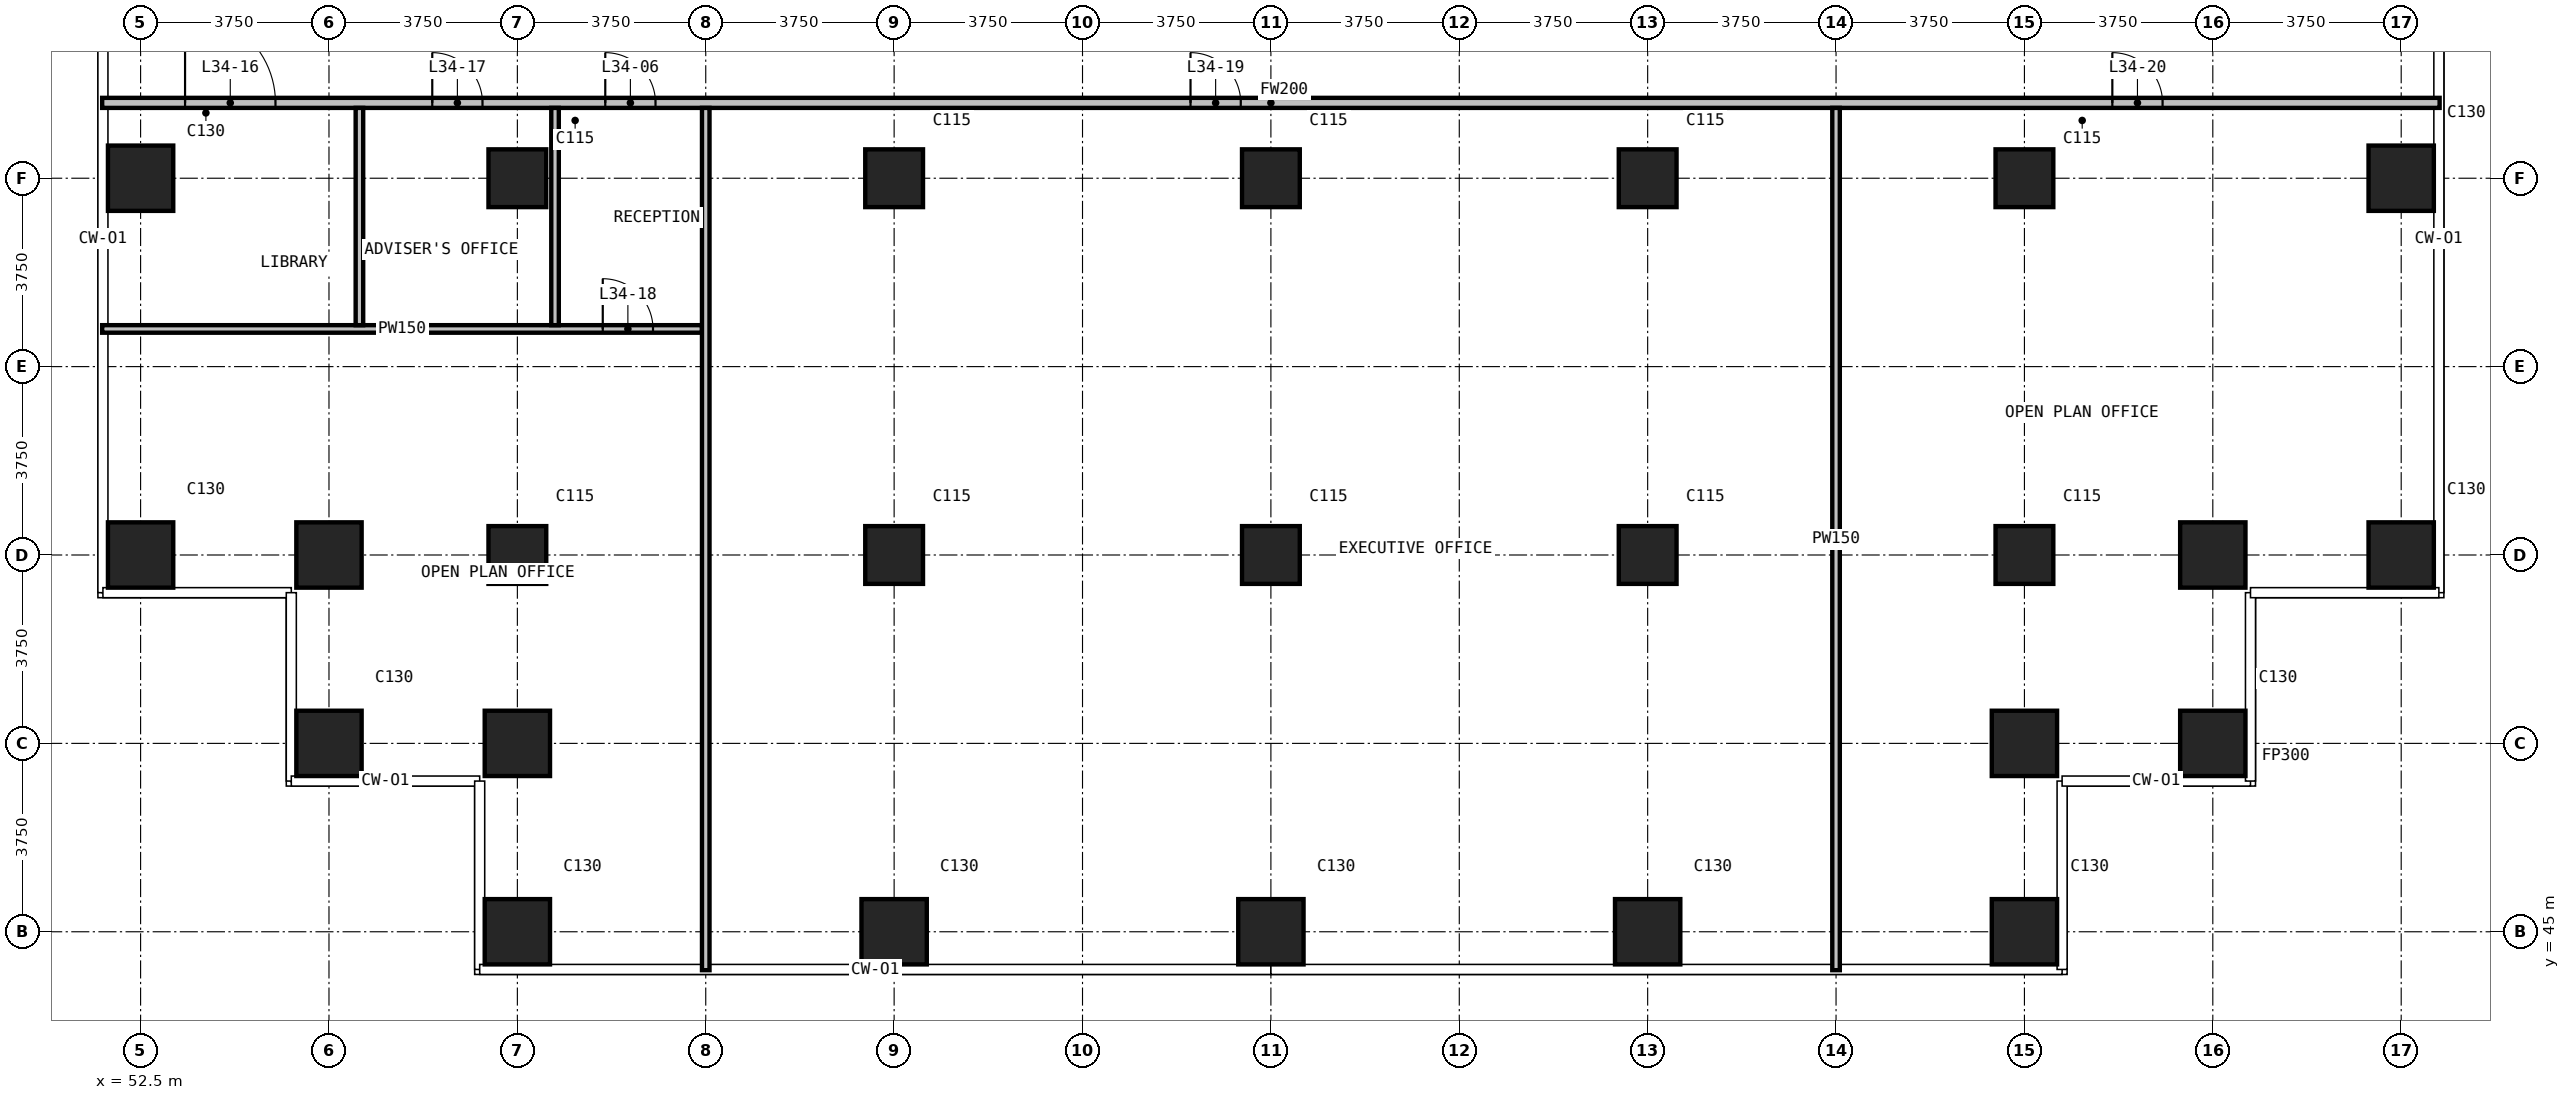
"""IFC4 building model, lengths in metres.
Left out: names, types, materials, properties, quantities, classifications, styles, units other than length and angle.
Written with IfcOpenShell. Run it as: python <this file> out.ifc"""

import sys

from ifc_helpers import new_model, si_unit, direction, frame, frame_2d, origin, origin_2d, place, context, subcontext, project, spatial, rectangle, extrude, element, fill, save


model = new_model("IFC4")
c1 = context("Model", 3, precision=1e-05, world=origin(), true_north=direction((0.0, 1.0)))
c2 = subcontext(c1, "Body", "Model", "MODEL_VIEW")
j1 = project(units=[si_unit("LENGTHUNIT", "METRE"), si_unit("PLANEANGLEUNIT", "RADIAN")], contexts=[c1])
p1 = place(None, origin())
s1 = spatial("IfcSite", under=j1, at=p1, CompositionType="ELEMENT")
p2 = place(p1, origin())
s2 = spatial("IfcBuilding", under=s1, at=p2, CompositionType="ELEMENT")
p3 = place(p2, frame((0.0, 0.0, 136.0)))
s3 = spatial("IfcBuildingStorey", under=s2, at=p3, CompositionType="ELEMENT", Elevation=136.0)
for number, where, z_axis, x_axis in (
    (1, (52.5, 52.5, 0.0), (0.0, 0.0, 1.0), (1.0, 0.0, 0.0)),
    (2, (52.5, 60.0, 0.0), (0.0, 0.0, 1.0), (1.0, 0.0, 0.0)),
    (3, (56.25, 48.75, 0.0), (0.0, 0.0, 1.0), (1.0, 0.0, 0.0)),
    (4, (56.25, 52.5, 0.0), (0.0, 0.0, 1.0), (1.0, 0.0, 0.0)),
    (5, (60.0, 45.0, 0.0), (0.0, 0.0, 1.0), (1.0, 0.0, 0.0)),
    (6, (60.0, 48.75, 0.0), (0.0, 0.0, 1.0), (1.0, 0.0, 0.0)),
):
    element("IfcColumn", number, at=place(p3, frame(where, z_axis=z_axis, x_axis=x_axis)), inside=s3, PredefinedType="COLUMN", context=c2, shape_type="SweptSolid", body=[
        extrude(rectangle(XDim=1.3, YDim=1.3, at=origin_2d()), origin(), (0.0, 0.0, 1.0), 3.6),
    ])
for number, where, z_axis, x_axis in (
    (7, (60.0, 52.5, 0.0), (0.0, 0.0, 1.0), (1.0, 0.0, 0.0)),
    (8, (60.0, 60.0, 0.0), (0.0, 0.0, 1.0), (1.0, 0.0, 0.0)),
):
    element("IfcColumn", number, at=place(p3, frame(where, z_axis=z_axis, x_axis=x_axis)), inside=s3, PredefinedType="COLUMN", context=c2, shape_type="SweptSolid", body=[
        extrude(rectangle(XDim=1.15, YDim=1.15, at=origin_2d()), origin(), (0.0, 0.0, 1.0), 3.6),
    ])
p4 = place(p3, frame((67.5, 45.0, 0.0), z_axis=(0.0, 0.0, 1.0), x_axis=(1.0, 0.0, 0.0)))
e9 = element("IfcColumn", 9, at=p4, inside=s3, PredefinedType="COLUMN", context=c2, shape_type="SweptSolid", body=[
    extrude(rectangle(XDim=1.3, YDim=1.3, at=origin_2d()), origin(), (0.0, 0.0, 1.0), 3.6),
])
for number, where, z_axis, x_axis in (
    (10, (67.5, 52.5, 0.0), (0.0, 0.0, 1.0), (1.0, 0.0, 0.0)),
    (11, (67.5, 60.0, 0.0), (0.0, 0.0, 1.0), (1.0, 0.0, 0.0)),
):
    element("IfcColumn", number, at=place(p3, frame(where, z_axis=z_axis, x_axis=x_axis)), inside=s3, PredefinedType="COLUMN", context=c2, shape_type="SweptSolid", body=[
        extrude(rectangle(XDim=1.15, YDim=1.15, at=origin_2d()), origin(), (0.0, 0.0, 1.0), 3.6),
    ])
p5 = place(p3, frame((75.0, 45.0, 0.0), z_axis=(0.0, 0.0, 1.0), x_axis=(1.0, 0.0, 0.0)))
e12 = element("IfcColumn", 12, at=p5, inside=s3, PredefinedType="COLUMN", context=c2, shape_type="SweptSolid", body=[
    extrude(rectangle(XDim=1.3, YDim=1.3, at=origin_2d()), origin(), (0.0, 0.0, 1.0), 3.6),
])
for number, where, z_axis, x_axis in (
    (13, (75.0, 52.5, 0.0), (0.0, 0.0, 1.0), (1.0, 0.0, 0.0)),
    (14, (75.0, 60.0, 0.0), (0.0, 0.0, 1.0), (1.0, 0.0, 0.0)),
):
    element("IfcColumn", number, at=place(p3, frame(where, z_axis=z_axis, x_axis=x_axis)), inside=s3, PredefinedType="COLUMN", context=c2, shape_type="SweptSolid", body=[
        extrude(rectangle(XDim=1.15, YDim=1.15, at=origin_2d()), origin(), (0.0, 0.0, 1.0), 3.6),
    ])
p6 = place(p3, frame((82.5, 45.0, 0.0), z_axis=(0.0, 0.0, 1.0), x_axis=(1.0, 0.0, 0.0)))
e15 = element("IfcColumn", 15, at=p6, inside=s3, PredefinedType="COLUMN", context=c2, shape_type="SweptSolid", body=[
    extrude(rectangle(XDim=1.3, YDim=1.3, at=origin_2d()), origin(), (0.0, 0.0, 1.0), 3.6),
])
for number, where, z_axis, x_axis in (
    (16, (82.5, 52.5, 0.0), (0.0, 0.0, 1.0), (1.0, 0.0, 0.0)),
    (17, (82.5, 60.0, 0.0), (0.0, 0.0, 1.0), (1.0, 0.0, 0.0)),
):
    element("IfcColumn", number, at=place(p3, frame(where, z_axis=z_axis, x_axis=x_axis)), inside=s3, PredefinedType="COLUMN", context=c2, shape_type="SweptSolid", body=[
        extrude(rectangle(XDim=1.15, YDim=1.15, at=origin_2d()), origin(), (0.0, 0.0, 1.0), 3.6),
    ])
for number, where, z_axis, x_axis in (
    (18, (90.0, 45.0, 0.0), (0.0, 0.0, 1.0), (1.0, 0.0, 0.0)),
    (19, (90.0, 48.75, 0.0), (0.0, 0.0, 1.0), (1.0, 0.0, 0.0)),
):
    element("IfcColumn", number, at=place(p3, frame(where, z_axis=z_axis, x_axis=x_axis)), inside=s3, PredefinedType="COLUMN", context=c2, shape_type="SweptSolid", body=[
        extrude(rectangle(XDim=1.3, YDim=1.3, at=origin_2d()), origin(), (0.0, 0.0, 1.0), 3.6),
    ])
for number, where, z_axis, x_axis in (
    (20, (90.0, 52.5, 0.0), (0.0, 0.0, 1.0), (1.0, 0.0, 0.0)),
    (21, (90.0, 60.0, 0.0), (0.0, 0.0, 1.0), (1.0, 0.0, 0.0)),
):
    element("IfcColumn", number, at=place(p3, frame(where, z_axis=z_axis, x_axis=x_axis)), inside=s3, PredefinedType="COLUMN", context=c2, shape_type="SweptSolid", body=[
        extrude(rectangle(XDim=1.15, YDim=1.15, at=origin_2d()), origin(), (0.0, 0.0, 1.0), 3.6),
    ])
for number, where, z_axis, x_axis in (
    (22, (93.75, 48.75, 0.0), (0.0, 0.0, 1.0), (1.0, 0.0, 0.0)),
    (23, (93.75, 52.5, 0.0), (0.0, 0.0, 1.0), (1.0, 0.0, 0.0)),
    (24, (97.5, 52.5, 0.0), (0.0, 0.0, 1.0), (1.0, 0.0, 0.0)),
    (25, (97.5, 60.0, 0.0), (0.0, 0.0, 1.0), (1.0, 0.0, 0.0)),
):
    element("IfcColumn", number, at=place(p3, frame(where, z_axis=z_axis, x_axis=x_axis)), inside=s3, PredefinedType="COLUMN", context=c2, shape_type="SweptSolid", body=[
        extrude(rectangle(XDim=1.3, YDim=1.3, at=origin_2d()), origin(), (0.0, 0.0, 1.0), 3.6),
    ])
p7 = place(p3, frame((51.735, 61.5, 0.0), z_axis=(0.0, 0.0, 1.0), x_axis=(1.0, 0.0, 0.0)))
e26 = element("IfcWall", 26, at=p7, inside=s3, PredefinedType="PARTITIONING", context=c2, shape_type="SweptSolid", body=[
    extrude(rectangle(XDim=46.53, YDim=0.2, at=frame_2d((23.265, 0.0))), origin(), (0.0, 0.0, 1.0), 3.3),
])
p8 = place(p7, frame((10.015, 0.0, 0.0)))
e27 = element("IfcOpeningElement", 27, at=p8, cuts=e26, PredefinedType="OPENING", context=c2, shape_type="SweptSolid", body=[
    extrude(rectangle(XDim=1.0, YDim=2.2, at=frame_2d((0.5, 1.1))), frame((0.0, 0.11, 0.0), z_axis=(0.0, -1.0, 0.0), x_axis=(1.0, 0.0, 0.0)), (0.0, 0.0, 1.0), 0.22),
])
p9 = place(p7, frame((1.65, 0.0, 0.0)))
e28 = element("IfcOpeningElement", 28, at=p9, cuts=e26, PredefinedType="OPENING", context=c2, shape_type="SweptSolid", body=[
    extrude(rectangle(XDim=1.8, YDim=2.2, at=frame_2d((0.9, 1.1))), frame((0.0, 0.11, 0.0), z_axis=(0.0, -1.0, 0.0), x_axis=(1.0, 0.0, 0.0)), (0.0, 0.0, 1.0), 0.22),
])
p10 = place(p7, frame((6.571, 0.0, 0.0)))
e29 = element("IfcOpeningElement", 29, at=p10, cuts=e26, PredefinedType="OPENING", context=c2, shape_type="SweptSolid", body=[
    extrude(rectangle(XDim=1.0, YDim=2.2, at=frame_2d((0.5, 1.1))), frame((0.0, 0.11, 0.0), z_axis=(0.0, -1.0, 0.0), x_axis=(1.0, 0.0, 0.0)), (0.0, 0.0, 1.0), 0.22),
])
p11 = place(p7, frame((21.665, 0.0, 0.0)))
e30 = element("IfcOpeningElement", 30, at=p11, cuts=e26, PredefinedType="OPENING", context=c2, shape_type="SweptSolid", body=[
    extrude(rectangle(XDim=1.0, YDim=2.2, at=frame_2d((0.5, 1.1))), frame((0.0, 0.11, 0.0), z_axis=(0.0, -1.0, 0.0), x_axis=(1.0, 0.0, 0.0)), (0.0, 0.0, 1.0), 0.22),
])
p12 = place(p7, frame((40.015, 0.0, 0.0)))
e31 = element("IfcOpeningElement", 31, at=p12, cuts=e26, PredefinedType="OPENING", context=c2, shape_type="SweptSolid", body=[
    extrude(rectangle(XDim=1.0, YDim=2.2, at=frame_2d((0.5, 1.1))), frame((0.0, 0.11, 0.0), z_axis=(0.0, -1.0, 0.0), x_axis=(1.0, 0.0, 0.0)), (0.0, 0.0, 1.0), 0.22),
])
p13 = place(p3, frame((51.735, 57.0, 0.0), z_axis=(0.0, 0.0, 1.0), x_axis=(1.0, 0.0, 0.0)))
e32 = element("IfcWall", 32, at=p13, inside=s3, PredefinedType="PARTITIONING", context=c2, shape_type="SweptSolid", body=[
    extrude(rectangle(XDim=11.94, YDim=0.15, at=frame_2d((5.97, 0.0))), origin(), (0.0, 0.0, 1.0), 3.3),
])
p14 = place(p13, frame((9.965, 0.0, 0.0)))
e33 = element("IfcOpeningElement", 33, at=p14, cuts=e32, PredefinedType="OPENING", context=c2, shape_type="SweptSolid", body=[
    extrude(rectangle(XDim=1.0, YDim=2.2, at=frame_2d((0.5, 1.1))), frame((0.0, 0.085, 0.0), z_axis=(0.0, -1.0, 0.0), x_axis=(1.0, 0.0, 0.0)), (0.0, 0.0, 1.0), 0.17),
])
for number, where, z_axis, x_axis in (
    (34, (56.856, 57.075, 0.0), (0.0, 0.0, 1.0), (0.0, 1.0, 0.0)),
    (35, (60.75, 57.075, 0.0), (0.0, 0.0, 1.0), (0.0, 1.0, 0.0)),
):
    element("IfcWall", number, at=place(p3, frame(where, z_axis=z_axis, x_axis=x_axis)), inside=s3, PredefinedType="PARTITIONING", context=c2, shape_type="SweptSolid", body=[
        extrude(rectangle(XDim=4.325, YDim=0.15, at=frame_2d((2.163, 0.0))), origin(), (0.0, 0.0, 1.0), 3.3),
    ])
for number, where, z_axis, x_axis in (
    (36, (63.75, 44.235, 0.0), (0.0, 0.0, 1.0), (0.0, 1.0, 0.0)),
    (37, (86.25, 44.235, 0.0), (0.0, 0.0, 1.0), (0.0, 1.0, 0.0)),
):
    element("IfcWall", number, at=place(p3, frame(where, z_axis=z_axis, x_axis=x_axis)), inside=s3, PredefinedType="PARTITIONING", context=c2, shape_type="SweptSolid", body=[
        extrude(rectangle(XDim=17.165, YDim=0.15, at=frame_2d((8.583, 0.0))), origin(), (0.0, 0.0, 1.0), 3.3),
    ])
p15 = place(p8, origin())
e38 = element("IfcDoor", 38, at=p15, inside=s3, OperationType="SINGLE_SWING_LEFT", PredefinedType="DOOR", context=c2, shape_type="SweptSolid", body=[
    extrude(rectangle(XDim=1.0, YDim=2.2, at=frame_2d((0.5, 1.1))), frame((0.0, 0.025, 0.0), z_axis=(0.0, -1.0, 0.0), x_axis=(1.0, 0.0, 0.0)), (0.0, 0.0, 1.0), 0.05),
])
fill(e27, e38)
p16 = place(p9, origin())
e39 = element("IfcDoor", 39, at=p16, inside=s3, OperationType="DOUBLE_DOOR_SINGLE_SWING", PredefinedType="DOOR", context=c2, shape_type="SweptSolid", body=[
    extrude(rectangle(XDim=1.8, YDim=2.2, at=frame_2d((0.9, 1.1))), frame((0.0, 0.025, 0.0), z_axis=(0.0, -1.0, 0.0), x_axis=(1.0, 0.0, 0.0)), (0.0, 0.0, 1.0), 0.05),
])
fill(e28, e39)
p17 = place(p10, origin())
e40 = element("IfcDoor", 40, at=p17, inside=s3, OperationType="SINGLE_SWING_LEFT", PredefinedType="DOOR", context=c2, shape_type="SweptSolid", body=[
    extrude(rectangle(XDim=1.0, YDim=2.2, at=frame_2d((0.5, 1.1))), frame((0.0, 0.025, 0.0), z_axis=(0.0, -1.0, 0.0), x_axis=(1.0, 0.0, 0.0)), (0.0, 0.0, 1.0), 0.05),
])
fill(e29, e40)
p18 = place(p14, origin())
e41 = element("IfcDoor", 41, at=p18, inside=s3, OperationType="SINGLE_SWING_LEFT", PredefinedType="DOOR", context=c2, shape_type="SweptSolid", body=[
    extrude(rectangle(XDim=1.0, YDim=2.2, at=frame_2d((0.5, 1.1))), frame((0.0, 0.025, 0.0), z_axis=(0.0, -1.0, 0.0), x_axis=(1.0, 0.0, 0.0)), (0.0, 0.0, 1.0), 0.05),
])
fill(e33, e41)
p19 = place(p11, origin())
e42 = element("IfcDoor", 42, at=p19, inside=s3, OperationType="SINGLE_SWING_LEFT", PredefinedType="DOOR", context=c2, shape_type="SweptSolid", body=[
    extrude(rectangle(XDim=1.0, YDim=2.2, at=frame_2d((0.5, 1.1))), frame((0.0, 0.025, 0.0), z_axis=(0.0, -1.0, 0.0), x_axis=(1.0, 0.0, 0.0)), (0.0, 0.0, 1.0), 0.05),
])
fill(e30, e42)
p20 = place(p12, origin())
e43 = element("IfcDoor", 43, at=p20, inside=s3, OperationType="SINGLE_SWING_LEFT", PredefinedType="DOOR", context=c2, shape_type="SweptSolid", body=[
    extrude(rectangle(XDim=1.0, YDim=2.2, at=frame_2d((0.5, 1.1))), frame((0.0, 0.025, 0.0), z_axis=(0.0, -1.0, 0.0), x_axis=(1.0, 0.0, 0.0)), (0.0, 0.0, 1.0), 0.05),
])
fill(e31, e43)
save(model, sys.argv[1])
